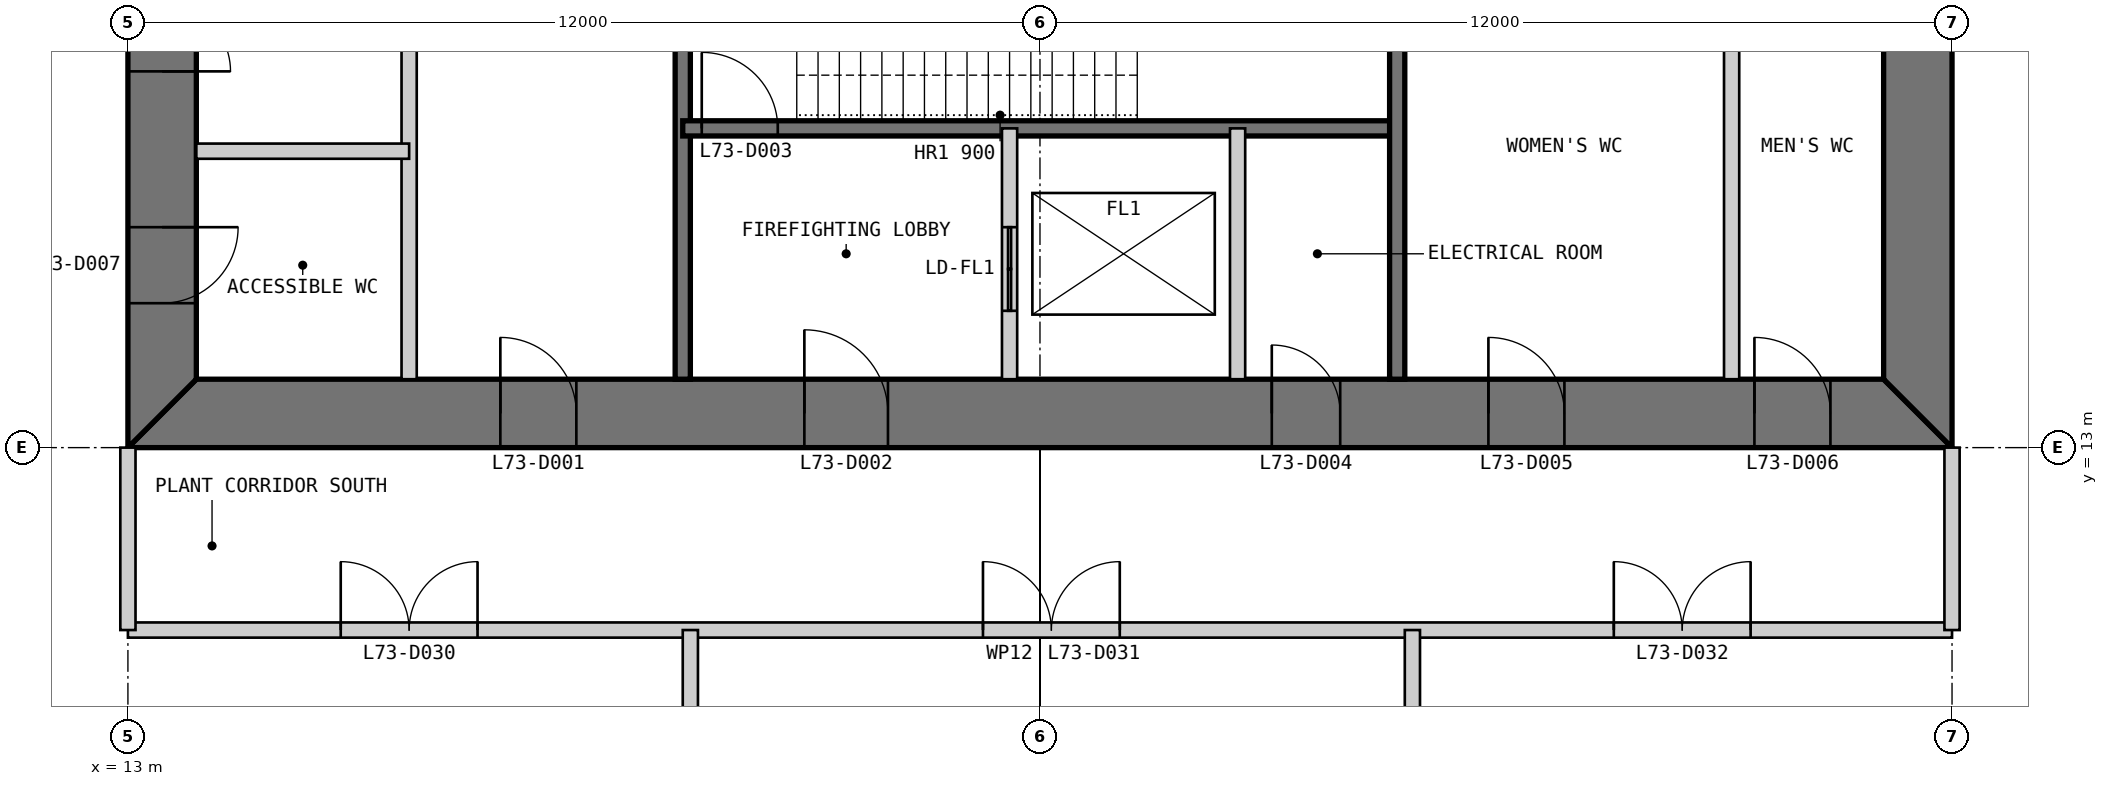
"""IFC4 building model, lengths in metres.
Left out: names, types, materials, properties, quantities, classifications, styles, units other than length and angle.
Written with IfcOpenShell. Run it as: python <this file> out.ifc"""

import sys

from ifc_helpers import new_model, si_unit, direction, frame, frame_2d, origin, place, context, subcontext, project, spatial, polyline, rectangle, outline, extrude, element, fill, save


model = new_model("IFC4")
c1 = context("Model", 3, precision=1e-05, world=origin(), true_north=direction((0.0, 1.0)))
c2 = subcontext(c1, "Body", "Model", "MODEL_VIEW")
j1 = project(units=[si_unit("LENGTHUNIT", "METRE"), si_unit("PLANEANGLEUNIT", "RADIAN")], contexts=[c1])
p1 = place(None, origin())
s1 = spatial("IfcSite", under=j1, at=p1, CompositionType="ELEMENT")
p2 = place(p1, origin())
s2 = spatial("IfcBuilding", under=s1, at=p2, CompositionType="ELEMENT")
p3 = place(p2, frame((0.0, 0.0, 301.8)))
s3 = spatial("IfcBuildingStorey", under=s2, at=p3, CompositionType="ELEMENT", Elevation=301.8)
p4 = place(p3, frame((13.0, 13.45, 0.0), z_axis=(0.0, 0.0, 1.0), x_axis=(1.0, 0.0, 0.0)))
e1 = element("IfcWall", 1, at=p4, inside=s3, PredefinedType="SHEAR", context=c2, shape_type="SweptSolid", body=[
    extrude(outline(polyline([(0.0, -0.45), (24.0, -0.45), (23.1, 0.45), (0.9, 0.45), (0.0, -0.45)])), origin(), (0.0, 0.0, 1.0), 6.0),
])
p5 = place(p4, frame((4.9, 0.0, 0.0)))
e2 = element("IfcOpeningElement", 2, at=p5, cuts=e1, PredefinedType="OPENING", context=c2, shape_type="SweptSolid", body=[
    extrude(rectangle(XDim=1.0, YDim=2.2, at=frame_2d((0.5, 1.1))), frame((0.0, 0.46, 0.0), z_axis=(0.0, -1.0, 0.0), x_axis=(1.0, 0.0, 0.0)), (0.0, 0.0, 1.0), 0.92),
])
p6 = place(p4, frame((8.9, 0.0, 0.0)))
e3 = element("IfcOpeningElement", 3, at=p6, cuts=e1, PredefinedType="OPENING", context=c2, shape_type="SweptSolid", body=[
    extrude(rectangle(XDim=1.1, YDim=2.2, at=frame_2d((0.55, 1.1))), frame((0.0, 0.46, 0.0), z_axis=(0.0, -1.0, 0.0), x_axis=(1.0, 0.0, 0.0)), (0.0, 0.0, 1.0), 0.92),
])
p7 = place(p4, frame((15.05, 0.0, 0.0)))
e4 = element("IfcOpeningElement", 4, at=p7, cuts=e1, PredefinedType="OPENING", context=c2, shape_type="SweptSolid", body=[
    extrude(rectangle(XDim=0.9, YDim=2.2, at=frame_2d((0.45, 1.1))), frame((0.0, 0.46, 0.0), z_axis=(0.0, -1.0, 0.0), x_axis=(1.0, 0.0, 0.0)), (0.0, 0.0, 1.0), 0.92),
])
p8 = place(p4, frame((17.9, 0.0, 0.0)))
e5 = element("IfcOpeningElement", 5, at=p8, cuts=e1, PredefinedType="OPENING", context=c2, shape_type="SweptSolid", body=[
    extrude(rectangle(XDim=1.0, YDim=2.2, at=frame_2d((0.5, 1.1))), frame((0.0, 0.46, 0.0), z_axis=(0.0, -1.0, 0.0), x_axis=(1.0, 0.0, 0.0)), (0.0, 0.0, 1.0), 0.92),
])
p9 = place(p4, frame((21.4, 0.0, 0.0)))
e6 = element("IfcOpeningElement", 6, at=p9, cuts=e1, PredefinedType="OPENING", context=c2, shape_type="SweptSolid", body=[
    extrude(rectangle(XDim=1.0, YDim=2.2, at=frame_2d((0.5, 1.1))), frame((0.0, 0.46, 0.0), z_axis=(0.0, -1.0, 0.0), x_axis=(1.0, 0.0, 0.0)), (0.0, 0.0, 1.0), 0.92),
])
p10 = place(p3, frame((36.55, 13.9, 0.0), z_axis=(0.0, 0.0, 1.0), x_axis=(0.0, 1.0, 0.0)))
e7 = element("IfcWall", 7, at=p10, inside=s3, PredefinedType="SHEAR", context=c2, shape_type="SweptSolid", body=[
    extrude(outline(polyline([(-0.9, -0.45), (23.1, -0.45), (22.2, 0.45), (0.0, 0.45), (-0.9, -0.45)])), origin(), (0.0, 0.0, 1.0), 6.0),
])
p11 = place(p10, frame((20.2, 0.0, 0.0)))
e8 = element("IfcOpeningElement", 8, at=p11, cuts=e7, PredefinedType="OPENING", context=c2, shape_type="SweptSolid", body=[
    extrude(rectangle(XDim=1.0, YDim=2.2, at=frame_2d((0.5, 1.1))), frame((0.0, 0.46, 0.0), z_axis=(0.0, -1.0, 0.0), x_axis=(1.0, 0.0, 0.0)), (0.0, 0.0, 1.0), 0.92),
])
p12 = place(p10, frame((17.25, 0.0, 0.0)))
e9 = element("IfcOpeningElement", 9, at=p12, cuts=e7, PredefinedType="OPENING", context=c2, shape_type="SweptSolid", body=[
    extrude(rectangle(XDim=0.9, YDim=2.2, at=frame_2d((0.45, 1.1))), frame((0.0, 0.46, 0.0), z_axis=(0.0, -1.0, 0.0), x_axis=(1.0, 0.0, 0.0)), (0.0, 0.0, 1.0), 0.92),
])
p13 = place(p3, frame((13.45, 36.1, 0.0), z_axis=(0.0, 0.0, 1.0), x_axis=(0.0, -1.0, 0.0)))
e10 = element("IfcWall", 10, at=p13, inside=s3, PredefinedType="SHEAR", context=c2, shape_type="SweptSolid", body=[
    extrude(outline(polyline([(-0.9, -0.45), (23.1, -0.45), (22.2, 0.45), (0.0, 0.45), (-0.9, -0.45)])), origin(), (0.0, 0.0, 1.0), 6.0),
])
p14 = place(p13, frame((20.2, 0.0, 0.0)))
e11 = element("IfcOpeningElement", 11, at=p14, cuts=e10, PredefinedType="OPENING", context=c2, shape_type="SweptSolid", body=[
    extrude(rectangle(XDim=1.0, YDim=2.2, at=frame_2d((0.5, 1.1))), frame((0.0, 0.46, 0.0), z_axis=(0.0, -1.0, 0.0), x_axis=(1.0, 0.0, 0.0)), (0.0, 0.0, 1.0), 0.92),
])
p15 = place(p13, frame((17.25, 0.0, 0.0)))
e12 = element("IfcOpeningElement", 12, at=p15, cuts=e10, PredefinedType="OPENING", context=c2, shape_type="SweptSolid", body=[
    extrude(rectangle(XDim=0.9, YDim=2.2, at=frame_2d((0.45, 1.1))), frame((0.0, 0.46, 0.0), z_axis=(0.0, -1.0, 0.0), x_axis=(1.0, 0.0, 0.0)), (0.0, 0.0, 1.0), 0.92),
])
p16 = place(p3, frame((16.7, 13.9, 0.0), z_axis=(0.0, 0.0, 1.0), x_axis=(0.0, 1.0, 0.0)))
e13 = element("IfcWall", 13, at=p16, inside=s3, PredefinedType="PARTITIONING", context=c2, shape_type="SweptSolid", body=[
    extrude(rectangle(XDim=16.1, YDim=0.2, at=frame_2d((8.05, 0.0))), origin(), (0.0, 0.0, 1.0), 5.8),
])
p17 = place(p16, frame((9.65, 0.0, 0.0)))
e14 = element("IfcOpeningElement", 14, at=p17, cuts=e13, PredefinedType="OPENING", context=c2, shape_type="SweptSolid", body=[
    extrude(rectangle(XDim=0.9, YDim=2.2, at=frame_2d((0.45, 1.1))), frame((0.0, 0.11, 0.0), z_axis=(0.0, -1.0, 0.0), x_axis=(1.0, 0.0, 0.0)), (0.0, 0.0, 1.0), 0.22),
])
p18 = place(p16, frame((13.65, 0.0, 0.0)))
e15 = element("IfcOpeningElement", 15, at=p18, cuts=e13, PredefinedType="OPENING", context=c2, shape_type="SweptSolid", body=[
    extrude(rectangle(XDim=0.9, YDim=2.2, at=frame_2d((0.45, 1.1))), frame((0.0, 0.11, 0.0), z_axis=(0.0, -1.0, 0.0), x_axis=(1.0, 0.0, 0.0)), (0.0, 0.0, 1.0), 0.22),
])
p19 = place(p3, frame((20.3, 13.9, 0.0), z_axis=(0.0, 0.0, 1.0), x_axis=(0.0, 1.0, 0.0)))
e16 = element("IfcWall", 16, at=p19, inside=s3, PredefinedType="SOLIDWALL", context=c2, shape_type="SweptSolid", body=[
    extrude(rectangle(XDim=16.1, YDim=0.2, at=frame_2d((8.05, 0.0))), origin(), (0.0, 0.0, 1.0), 5.8),
])
p20 = place(p19, frame((8.4, 0.0, 0.0)))
e17 = element("IfcOpeningElement", 17, at=p20, cuts=e16, PredefinedType="OPENING", context=c2, shape_type="SweptSolid", body=[
    extrude(rectangle(XDim=0.9, YDim=2.2, at=frame_2d((0.45, 1.1))), frame((0.0, 0.11, 0.0), z_axis=(0.0, -1.0, 0.0), x_axis=(1.0, 0.0, 0.0)), (0.0, 0.0, 1.0), 0.22),
])
p21 = place(p19, frame((13.4, 0.0, 0.0)))
e18 = element("IfcOpeningElement", 18, at=p21, cuts=e16, PredefinedType="OPENING", context=c2, shape_type="SweptSolid", body=[
    extrude(rectangle(XDim=0.9, YDim=2.2, at=frame_2d((0.45, 1.1))), frame((0.0, 0.11, 0.0), z_axis=(0.0, -1.0, 0.0), x_axis=(1.0, 0.0, 0.0)), (0.0, 0.0, 1.0), 0.22),
])
p22 = place(p3, frame((20.3, 17.2, 0.0), z_axis=(0.0, 0.0, 1.0), x_axis=(1.0, 0.0, 0.0)))
e19 = element("IfcWall", 19, at=p22, inside=s3, PredefinedType="SOLIDWALL", context=c2, shape_type="SweptSolid", body=[
    extrude(rectangle(XDim=9.4, YDim=0.2, at=frame_2d((4.7, 0.0))), origin(), (0.0, 0.0, 1.0), 5.8),
])
p23 = place(p22, frame((0.25, 0.0, 0.0)))
e20 = element("IfcOpeningElement", 20, at=p23, cuts=e19, PredefinedType="OPENING", context=c2, shape_type="SweptSolid", body=[
    extrude(rectangle(XDim=1.0, YDim=2.2, at=frame_2d((0.5, 1.1))), frame((0.0, 0.11, 0.0), z_axis=(0.0, -1.0, 0.0), x_axis=(1.0, 0.0, 0.0)), (0.0, 0.0, 1.0), 0.22),
])
p24 = place(p3, frame((24.6, 13.9, 0.0), z_axis=(0.0, 0.0, 1.0), x_axis=(0.0, 1.0, 0.0)))
e21 = element("IfcWall", 21, at=p24, inside=s3, PredefinedType="PARTITIONING", context=c2, shape_type="SweptSolid", body=[
    extrude(rectangle(XDim=3.3, YDim=0.2, at=frame_2d((1.65, 0.0))), origin(), (0.0, 0.0, 1.0), 5.8),
])
p25 = place(p24, frame((0.9, 0.0, 0.0)))
e22 = element("IfcOpeningElement", 22, at=p25, cuts=e21, PredefinedType="OPENING", context=c2, shape_type="SweptSolid", body=[
    extrude(rectangle(XDim=1.1, YDim=2.2, at=frame_2d((0.55, 1.1))), frame((0.0, 0.11, 0.0), z_axis=(0.0, -1.0, 0.0), x_axis=(1.0, 0.0, 0.0)), (0.0, 0.0, 1.0), 0.22),
])
p26 = place(p3, frame((27.6, 13.9, 0.0), z_axis=(0.0, 0.0, 1.0), x_axis=(0.0, 1.0, 0.0)))
e23 = element("IfcWall", 23, at=p26, inside=s3, PredefinedType="PARTITIONING", context=c2, shape_type="SweptSolid", body=[
    extrude(rectangle(XDim=3.3, YDim=0.2, at=frame_2d((1.65, 0.0))), origin(), (0.0, 0.0, 1.0), 5.8),
])
p27 = place(p3, frame((29.7, 13.9, 0.0), z_axis=(0.0, 0.0, 1.0), x_axis=(0.0, 1.0, 0.0)))
e24 = element("IfcWall", 24, at=p27, inside=s3, PredefinedType="SOLIDWALL", context=c2, shape_type="SweptSolid", body=[
    extrude(rectangle(XDim=6.1, YDim=0.2, at=frame_2d((3.05, 0.0))), origin(), (0.0, 0.0, 1.0), 5.8),
])
p28 = place(p3, frame((34.1, 13.9, 0.0), z_axis=(0.0, 0.0, 1.0), x_axis=(0.0, 1.0, 0.0)))
e25 = element("IfcWall", 25, at=p28, inside=s3, PredefinedType="PARTITIONING", context=c2, shape_type="SweptSolid", body=[
    extrude(rectangle(XDim=6.1, YDim=0.2, at=frame_2d((3.05, 0.0))), origin(), (0.0, 0.0, 1.0), 5.8),
])
p29 = place(p3, frame((13.9, 16.9, 0.0), z_axis=(0.0, 0.0, 1.0), x_axis=(1.0, 0.0, 0.0)))
e26 = element("IfcWall", 26, at=p29, inside=s3, PredefinedType="PARTITIONING", context=c2, shape_type="SweptSolid", body=[
    extrude(rectangle(XDim=2.8, YDim=0.2, at=frame_2d((1.4, 0.0))), origin(), (0.0, 0.0, 1.0), 5.8),
])
p30 = place(p3, frame((13.0, 10.6, 0.0), z_axis=(0.0, 0.0, 1.0), x_axis=(1.0, 0.0, 0.0)))
e27 = element("IfcWall", 27, at=p30, inside=s3, PredefinedType="PARTITIONING", context=c2, shape_type="SweptSolid", body=[
    extrude(rectangle(XDim=24.0, YDim=0.2, at=frame_2d((12.0, 0.0))), origin(), (0.0, 0.0, 1.0), 5.8),
])
p31 = place(p30, frame((2.8, 0.0, 0.0)))
e28 = element("IfcOpeningElement", 28, at=p31, cuts=e27, PredefinedType="OPENING", context=c2, shape_type="SweptSolid", body=[
    extrude(rectangle(XDim=1.8, YDim=2.4, at=frame_2d((0.9, 1.2))), frame((0.0, 0.11, 0.0), z_axis=(0.0, -1.0, 0.0), x_axis=(1.0, 0.0, 0.0)), (0.0, 0.0, 1.0), 0.22),
])
p32 = place(p30, frame((11.25, 0.0, 0.0)))
e29 = element("IfcOpeningElement", 29, at=p32, cuts=e27, PredefinedType="OPENING", context=c2, shape_type="SweptSolid", body=[
    extrude(rectangle(XDim=1.8, YDim=2.4, at=frame_2d((0.9, 1.2))), frame((0.0, 0.11, 0.0), z_axis=(0.0, -1.0, 0.0), x_axis=(1.0, 0.0, 0.0)), (0.0, 0.0, 1.0), 0.22),
])
p33 = place(p30, frame((19.55, 0.0, 0.0)))
e30 = element("IfcOpeningElement", 30, at=p33, cuts=e27, PredefinedType="OPENING", context=c2, shape_type="SweptSolid", body=[
    extrude(rectangle(XDim=1.8, YDim=2.4, at=frame_2d((0.9, 1.2))), frame((0.0, 0.11, 0.0), z_axis=(0.0, -1.0, 0.0), x_axis=(1.0, 0.0, 0.0)), (0.0, 0.0, 1.0), 0.22),
])
for number, where, z_axis, x_axis in (
    (31, (13.0, 10.6, 0.0), (0.0, 0.0, 1.0), (0.0, 1.0, 0.0)),
    (32, (37.0, 10.6, 0.0), (0.0, 0.0, 1.0), (0.0, 1.0, 0.0)),
):
    element("IfcWall", number, at=place(p3, frame(where, z_axis=z_axis, x_axis=x_axis)), inside=s3, PredefinedType="PARTITIONING", context=c2, shape_type="SweptSolid", body=[
        extrude(rectangle(XDim=2.4, YDim=0.2, at=frame_2d((1.2, 0.0))), origin(), (0.0, 0.0, 1.0), 4.853),
    ])
p34 = place(p3, frame((20.4, 0.0, 0.0), z_axis=(0.0, 0.0, 1.0), x_axis=(0.0, 1.0, 0.0)))
e33 = element("IfcWall", 33, at=p34, inside=s3, PredefinedType="PARTITIONING", context=c2, shape_type="SweptSolid", body=[
    extrude(rectangle(XDim=10.6, YDim=0.2, at=frame_2d((5.3, 0.0))), origin(), (0.0, 0.0, 1.0), 5.8),
])
p35 = place(p34, frame((4.4, 0.0, 0.0)))
e34 = element("IfcOpeningElement", 34, at=p35, cuts=e33, PredefinedType="OPENING", context=c2, shape_type="SweptSolid", body=[
    extrude(rectangle(XDim=1.8, YDim=2.4, at=frame_2d((0.9, 1.2))), frame((0.0, 0.11, 0.0), z_axis=(0.0, -1.0, 0.0), x_axis=(1.0, 0.0, 0.0)), (0.0, 0.0, 1.0), 0.22),
])
p36 = place(p3, frame((29.9, 0.0, 0.0), z_axis=(0.0, 0.0, 1.0), x_axis=(0.0, 1.0, 0.0)))
e35 = element("IfcWall", 35, at=p36, inside=s3, PredefinedType="PARTITIONING", context=c2, shape_type="SweptSolid", body=[
    extrude(rectangle(XDim=10.6, YDim=0.2, at=frame_2d((5.3, 0.0))), origin(), (0.0, 0.0, 1.0), 5.8),
])
p37 = place(p36, frame((4.4, 0.0, 0.0)))
e36 = element("IfcOpeningElement", 36, at=p37, cuts=e35, PredefinedType="OPENING", context=c2, shape_type="SweptSolid", body=[
    extrude(rectangle(XDim=1.8, YDim=2.4, at=frame_2d((0.9, 1.2))), frame((0.0, 0.11, 0.0), z_axis=(0.0, -1.0, 0.0), x_axis=(1.0, 0.0, 0.0)), (0.0, 0.0, 1.0), 0.22),
])
p38 = place(p5, origin())
e37 = element("IfcDoor", 37, at=p38, inside=s3, OperationType="SINGLE_SWING_LEFT", PredefinedType="DOOR", context=c2, shape_type="SweptSolid", body=[
    extrude(rectangle(XDim=1.0, YDim=2.2, at=frame_2d((0.5, 1.1))), frame((0.0, 0.025, 0.0), z_axis=(0.0, -1.0, 0.0), x_axis=(1.0, 0.0, 0.0)), (0.0, 0.0, 1.0), 0.05),
    extrude(outline(polyline([(0.0, 0.0), (0.04, 0.0), (0.04, 2.16), (0.96, 2.16), (0.96, 0.0), (1.0, 0.0), (1.0, 2.2), (0.0, 2.2), (0.0, 0.0)])), frame((0.0, 0.3, 0.0), z_axis=(0.0, -1.0, 0.0), x_axis=(1.0, 0.0, 0.0)), (0.0, 0.0, 1.0), 0.6),
])
fill(e2, e37)
p39 = place(p6, origin())
e38 = element("IfcDoor", 38, at=p39, inside=s3, OperationType="SINGLE_SWING_LEFT", PredefinedType="DOOR", context=c2, shape_type="SweptSolid", body=[
    extrude(rectangle(XDim=1.1, YDim=2.2, at=frame_2d((0.55, 1.1))), frame((0.0, 0.025, 0.0), z_axis=(0.0, -1.0, 0.0), x_axis=(1.0, 0.0, 0.0)), (0.0, 0.0, 1.0), 0.05),
    extrude(outline(polyline([(0.0, 0.0), (0.04, 0.0), (0.04, 2.16), (1.06, 2.16), (1.06, 0.0), (1.1, 0.0), (1.1, 2.2), (0.0, 2.2), (0.0, 0.0)])), frame((0.0, 0.3, 0.0), z_axis=(0.0, -1.0, 0.0), x_axis=(1.0, 0.0, 0.0)), (0.0, 0.0, 1.0), 0.6),
])
fill(e3, e38)
p40 = place(p23, origin())
e39 = element("IfcDoor", 39, at=p40, inside=s3, OperationType="SINGLE_SWING_LEFT", PredefinedType="DOOR", context=c2, shape_type="SweptSolid", body=[
    extrude(rectangle(XDim=1.0, YDim=2.2, at=frame_2d((0.5, 1.1))), frame((0.0, 0.025, 0.0), z_axis=(0.0, -1.0, 0.0), x_axis=(1.0, 0.0, 0.0)), (0.0, 0.0, 1.0), 0.05),
])
fill(e20, e39)
p41 = place(p7, origin())
e40 = element("IfcDoor", 40, at=p41, inside=s3, OperationType="SINGLE_SWING_LEFT", PredefinedType="DOOR", context=c2, shape_type="SweptSolid", body=[
    extrude(rectangle(XDim=0.9, YDim=2.2, at=frame_2d((0.45, 1.1))), frame((0.0, 0.025, 0.0), z_axis=(0.0, -1.0, 0.0), x_axis=(1.0, 0.0, 0.0)), (0.0, 0.0, 1.0), 0.05),
    extrude(outline(polyline([(0.0, 0.0), (0.04, 0.0), (0.04, 2.16), (0.86, 2.16), (0.86, 0.0), (0.9, 0.0), (0.9, 2.2), (0.0, 2.2), (0.0, 0.0)])), frame((0.0, 0.3, 0.0), z_axis=(0.0, -1.0, 0.0), x_axis=(1.0, 0.0, 0.0)), (0.0, 0.0, 1.0), 0.6),
])
fill(e4, e40)
p42 = place(p8, origin())
e41 = element("IfcDoor", 41, at=p42, inside=s3, OperationType="SINGLE_SWING_LEFT", PredefinedType="DOOR", context=c2, shape_type="SweptSolid", body=[
    extrude(rectangle(XDim=1.0, YDim=2.2, at=frame_2d((0.5, 1.1))), frame((0.0, 0.025, 0.0), z_axis=(0.0, -1.0, 0.0), x_axis=(1.0, 0.0, 0.0)), (0.0, 0.0, 1.0), 0.05),
    extrude(outline(polyline([(0.0, 0.0), (0.04, 0.0), (0.04, 2.16), (0.96, 2.16), (0.96, 0.0), (1.0, 0.0), (1.0, 2.2), (0.0, 2.2), (0.0, 0.0)])), frame((0.0, 0.3, 0.0), z_axis=(0.0, -1.0, 0.0), x_axis=(1.0, 0.0, 0.0)), (0.0, 0.0, 1.0), 0.6),
])
fill(e5, e41)
p43 = place(p9, origin())
e42 = element("IfcDoor", 42, at=p43, inside=s3, OperationType="SINGLE_SWING_LEFT", PredefinedType="DOOR", context=c2, shape_type="SweptSolid", body=[
    extrude(rectangle(XDim=1.0, YDim=2.2, at=frame_2d((0.5, 1.1))), frame((0.0, 0.025, 0.0), z_axis=(0.0, -1.0, 0.0), x_axis=(1.0, 0.0, 0.0)), (0.0, 0.0, 1.0), 0.05),
    extrude(outline(polyline([(0.0, 0.0), (0.04, 0.0), (0.04, 2.16), (0.96, 2.16), (0.96, 0.0), (1.0, 0.0), (1.0, 2.2), (0.0, 2.2), (0.0, 0.0)])), frame((0.0, 0.3, 0.0), z_axis=(0.0, -1.0, 0.0), x_axis=(1.0, 0.0, 0.0)), (0.0, 0.0, 1.0), 0.6),
])
fill(e6, e42)
p44 = place(p14, origin())
e43 = element("IfcDoor", 43, at=p44, inside=s3, OperationType="SINGLE_SWING_LEFT", PredefinedType="DOOR", context=c2, shape_type="SweptSolid", body=[
    extrude(rectangle(XDim=1.0, YDim=2.2, at=frame_2d((0.5, 1.1))), frame((0.0, 0.025, 0.0), z_axis=(0.0, -1.0, 0.0), x_axis=(1.0, 0.0, 0.0)), (0.0, 0.0, 1.0), 0.05),
    extrude(outline(polyline([(0.0, 0.0), (0.04, 0.0), (0.04, 2.16), (0.96, 2.16), (0.96, 0.0), (1.0, 0.0), (1.0, 2.2), (0.0, 2.2), (0.0, 0.0)])), frame((0.0, 0.3, 0.0), z_axis=(0.0, -1.0, 0.0), x_axis=(1.0, 0.0, 0.0)), (0.0, 0.0, 1.0), 0.6),
])
fill(e11, e43)
p45 = place(p15, origin())
e44 = element("IfcDoor", 44, at=p45, inside=s3, OperationType="SINGLE_SWING_RIGHT", PredefinedType="DOOR", context=c2, shape_type="SweptSolid", body=[
    extrude(rectangle(XDim=0.9, YDim=2.2, at=frame_2d((0.45, 1.1))), frame((0.0, 0.025, 0.0), z_axis=(0.0, -1.0, 0.0), x_axis=(1.0, 0.0, 0.0)), (0.0, 0.0, 1.0), 0.05),
    extrude(outline(polyline([(0.0, 0.0), (0.04, 0.0), (0.04, 2.16), (0.86, 2.16), (0.86, 0.0), (0.9, 0.0), (0.9, 2.2), (0.0, 2.2), (0.0, 0.0)])), frame((0.0, 0.3, 0.0), z_axis=(0.0, -1.0, 0.0), x_axis=(1.0, 0.0, 0.0)), (0.0, 0.0, 1.0), 0.6),
])
fill(e12, e44)
p46 = place(p31, origin())
e45 = element("IfcDoor", 45, at=p46, inside=s3, OperationType="DOUBLE_DOOR_SINGLE_SWING", PredefinedType="DOOR", context=c2, shape_type="SweptSolid", body=[
    extrude(rectangle(XDim=1.8, YDim=2.4, at=frame_2d((0.9, 1.2))), frame((0.0, 0.025, 0.0), z_axis=(0.0, -1.0, 0.0), x_axis=(1.0, 0.0, 0.0)), (0.0, 0.0, 1.0), 0.05),
])
fill(e28, e45)
p47 = place(p32, origin())
e46 = element("IfcDoor", 46, at=p47, inside=s3, OperationType="DOUBLE_DOOR_SINGLE_SWING", PredefinedType="DOOR", context=c2, shape_type="SweptSolid", body=[
    extrude(rectangle(XDim=1.8, YDim=2.4, at=frame_2d((0.9, 1.2))), frame((0.0, 0.025, 0.0), z_axis=(0.0, -1.0, 0.0), x_axis=(1.0, 0.0, 0.0)), (0.0, 0.0, 1.0), 0.05),
])
fill(e29, e46)
p48 = place(p33, origin())
e47 = element("IfcDoor", 47, at=p48, inside=s3, OperationType="DOUBLE_DOOR_SINGLE_SWING", PredefinedType="DOOR", context=c2, shape_type="SweptSolid", body=[
    extrude(rectangle(XDim=1.8, YDim=2.4, at=frame_2d((0.9, 1.2))), frame((0.0, 0.025, 0.0), z_axis=(0.0, -1.0, 0.0), x_axis=(1.0, 0.0, 0.0)), (0.0, 0.0, 1.0), 0.05),
])
fill(e30, e47)
p49 = place(p25, origin())
e48 = element("IfcDoor", 48, at=p49, inside=s3, OperationType="DOUBLE_DOOR_SLIDING", PredefinedType="DOOR", context=c2, shape_type="SweptSolid", body=[
    extrude(rectangle(XDim=1.1, YDim=2.2, at=frame_2d((0.55, 1.1))), frame((0.0, 0.025, 0.0), z_axis=(0.0, -1.0, 0.0), x_axis=(1.0, 0.0, 0.0)), (0.0, 0.0, 1.0), 0.05),
])
fill(e22, e48)
save(model, sys.argv[1])
